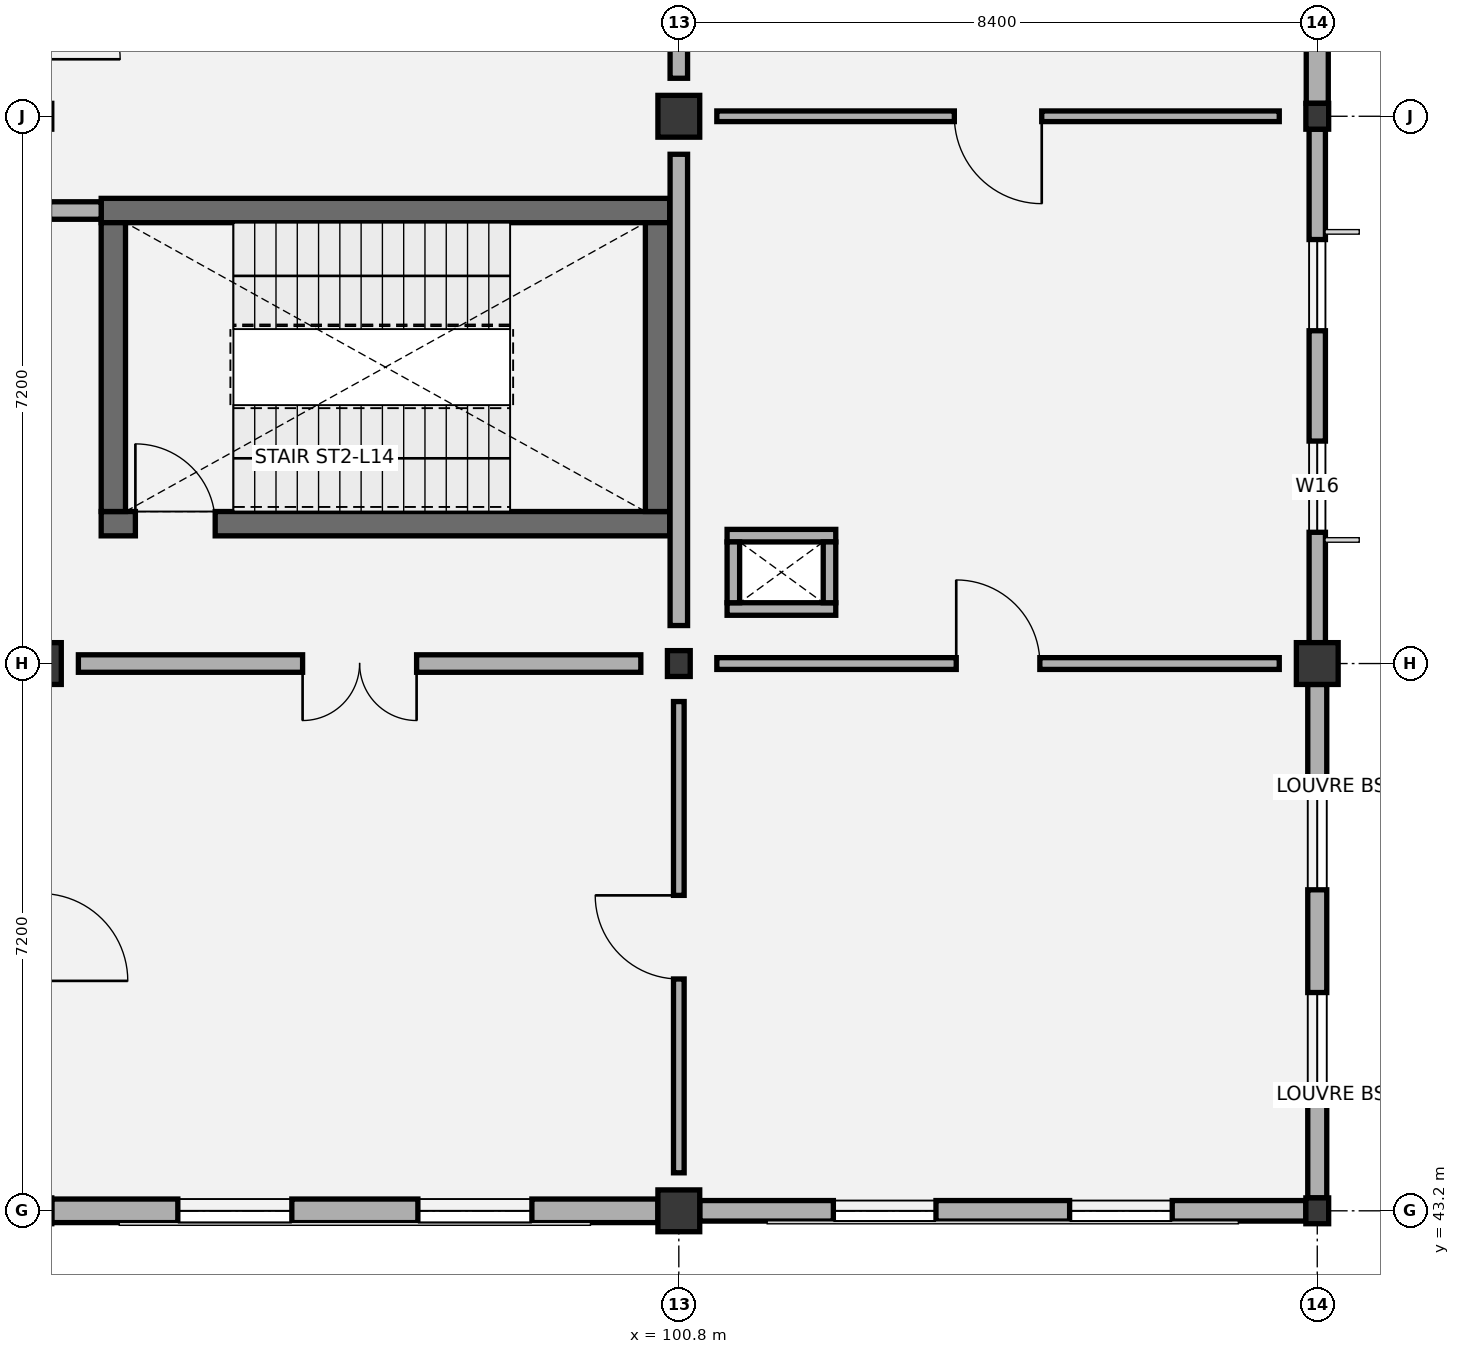
"""IFC4 building model, lengths in metres.
Left out: names, types, materials, properties, quantities, classifications, styles, units other than length and angle.
Written with IfcOpenShell. Run it as: python <this file> out.ifc"""

import sys

from ifc_helpers import new_model, si_unit, direction, frame, frame_2d, origin, origin_2d, place, context, subcontext, project, spatial, rectangle, i_section, extrude, element, fill, save


model = new_model("IFC4")
c1 = context("Model", 3, precision=1e-05, world=origin(), true_north=direction((0.0, 1.0)))
c2 = subcontext(c1, "Body", "Model", "MODEL_VIEW")
j1 = project(units=[si_unit("LENGTHUNIT", "METRE"), si_unit("PLANEANGLEUNIT", "RADIAN")], contexts=[c1])
p1 = place(None, origin())
s1 = spatial("IfcSite", under=j1, at=p1, CompositionType="ELEMENT")
p2 = place(p1, origin())
s2 = spatial("IfcBuilding", under=s1, at=p2, CompositionType="ELEMENT")
p3 = place(p2, frame((0.0, 0.0, 64.8)))
s3 = spatial("IfcBuildingStorey", under=s2, at=p3, CompositionType="ELEMENT", Elevation=64.8)
for number, where, z_axis, x_axis in (
    (1, (92.4, 50.4, 0.0), (0.0, 0.0, 1.0), (1.0, 0.0, 0.0)),
    (2, (100.8, 43.2, 0.0), (0.0, 0.0, 1.0), (1.0, 0.0, 0.0)),
):
    element("IfcColumn", number, at=place(p3, frame(where, z_axis=z_axis, x_axis=x_axis)), inside=s3, PredefinedType="COLUMN", context=c2, shape_type="SweptSolid", body=[
        extrude(rectangle(XDim=0.55, YDim=0.55, at=origin_2d()), origin(), (0.0, 0.0, 1.0), 4.2),
    ])
p4 = place(p3, frame((100.8, 50.4, 0.0), z_axis=(0.0, 0.0, 1.0), x_axis=(1.0, 0.0, 0.0)))
e3 = element("IfcColumn", 3, at=p4, inside=s3, PredefinedType="COLUMN", context=c2, shape_type="SweptSolid", body=[
    extrude(i_section(OverallWidth=0.3, OverallDepth=0.34, WebThickness=0.012, FlangeThickness=0.021, FilletRadius=0.027, at=origin_2d()), origin(), (0.0, 0.0, 1.0), 4.2),
])
p5 = place(p3, frame((100.8, 57.6, 0.0), z_axis=(0.0, 0.0, 1.0), x_axis=(1.0, 0.0, 0.0)))
e4 = element("IfcColumn", 4, at=p5, inside=s3, PredefinedType="COLUMN", context=c2, shape_type="SweptSolid", body=[
    extrude(rectangle(XDim=0.55, YDim=0.55, at=origin_2d()), origin(), (0.0, 0.0, 1.0), 4.2),
])
p6 = place(p3, frame((109.2, 43.2, 0.0), z_axis=(0.0, 0.0, 1.0), x_axis=(1.0, 0.0, 0.0)))
e5 = element("IfcColumn", 5, at=p6, inside=s3, PredefinedType="COLUMN", context=c2, shape_type="SweptSolid", body=[
    extrude(i_section(OverallWidth=0.3, OverallDepth=0.34, WebThickness=0.012, FlangeThickness=0.021, FilletRadius=0.027, at=origin_2d()), origin(), (0.0, 0.0, 1.0), 4.2),
])
p7 = place(p3, frame((109.2, 50.4, 0.0), z_axis=(0.0, 0.0, 1.0), x_axis=(1.0, 0.0, 0.0)))
e6 = element("IfcColumn", 6, at=p7, inside=s3, PredefinedType="COLUMN", context=c2, shape_type="SweptSolid", body=[
    extrude(rectangle(XDim=0.55, YDim=0.55, at=origin_2d()), origin(), (0.0, 0.0, 1.0), 4.2),
])
p8 = place(p3, frame((109.2, 57.6, 0.0), z_axis=(0.0, 0.0, 1.0), x_axis=(1.0, 0.0, 0.0)))
e7 = element("IfcColumn", 7, at=p8, inside=s3, PredefinedType="COLUMN", context=c2, shape_type="SweptSolid", body=[
    extrude(i_section(OverallWidth=0.3, OverallDepth=0.34, WebThickness=0.012, FlangeThickness=0.021, FilletRadius=0.027, at=origin_2d()), origin(), (0.0, 0.0, 1.0), 4.2),
])
p9 = place(p3, frame((93.2, 52.24, 0.0), z_axis=(0.0, 0.0, 1.0), x_axis=(1.0, 0.0, 0.0)))
e8 = element("IfcWall", 8, at=p9, inside=s3, PredefinedType="SHEAR", context=c2, shape_type="SweptSolid", body=[
    extrude(rectangle(XDim=7.48, YDim=0.32, at=frame_2d((3.74, 0.0))), origin(), (0.0, 0.0, 1.0), 3.9),
])
p10 = place(p9, frame((0.45, 0.0, 0.0)))
e9 = element("IfcOpeningElement", 9, at=p10, cuts=e8, PredefinedType="OPENING", context=c2, shape_type="SweptSolid", body=[
    extrude(rectangle(XDim=1.05, YDim=2.15, at=frame_2d((0.525, 1.075))), frame((0.0, 0.17, 0.0), z_axis=(0.0, -1.0, 0.0), x_axis=(1.0, 0.0, 0.0)), (0.0, 0.0, 1.0), 0.34),
])
p11 = place(p3, frame((93.2, 56.36, 0.0), z_axis=(0.0, 0.0, 1.0), x_axis=(1.0, 0.0, 0.0)))
e10 = element("IfcWall", 10, at=p11, inside=s3, PredefinedType="SHEAR", context=c2, shape_type="SweptSolid", body=[
    extrude(rectangle(XDim=7.48, YDim=0.32, at=frame_2d((3.74, 0.0))), origin(), (0.0, 0.0, 1.0), 3.9),
])
for number, where, z_axis, x_axis in (
    (11, (93.36, 52.4, 0.0), (0.0, 0.0, 1.0), (0.0, 1.0, 0.0)),
    (12, (100.52, 52.4, 0.0), (0.0, 0.0, 1.0), (0.0, 1.0, 0.0)),
):
    element("IfcWall", number, at=place(p3, frame(where, z_axis=z_axis, x_axis=x_axis)), inside=s3, PredefinedType="SHEAR", context=c2, shape_type="SweptSolid", body=[
        extrude(rectangle(XDim=3.8, YDim=0.32, at=frame_2d((1.9, 0.0))), origin(), (0.0, 0.0, 1.0), 3.9),
    ])
p12 = place(p3, frame((92.55, 43.2, 0.0), z_axis=(0.0, 0.0, 1.0), x_axis=(1.0, 0.0, 0.0)))
e13 = element("IfcWall", 13, at=p12, inside=s3, PredefinedType="SOLIDWALL", context=c2, shape_type="SweptSolid", body=[
    extrude(rectangle(XDim=7.975, YDim=0.31, at=frame_2d((3.987, 0.0))), origin(), (0.0, 0.0, 1.0), 3.345),
])
p13 = place(p12, frame((1.658, 0.0, 0.95)))
e14 = element("IfcOpeningElement", 14, at=p13, cuts=e13, PredefinedType="OPENING", context=c2, shape_type="SweptSolid", body=[
    extrude(rectangle(XDim=1.5, YDim=1.5, at=frame_2d((0.75, 0.75))), frame((0.0, 0.165, 0.0), z_axis=(0.0, -1.0, 0.0), x_axis=(1.0, 0.0, 0.0)), (0.0, 0.0, 1.0), 0.33),
])
p14 = place(p12, frame((4.817, 0.0, 0.95)))
e15 = element("IfcOpeningElement", 15, at=p14, cuts=e13, PredefinedType="OPENING", context=c2, shape_type="SweptSolid", body=[
    extrude(rectangle(XDim=1.5, YDim=1.5, at=frame_2d((0.75, 0.75))), frame((0.0, 0.165, 0.0), z_axis=(0.0, -1.0, 0.0), x_axis=(1.0, 0.0, 0.0)), (0.0, 0.0, 1.0), 0.33),
])
p15 = place(p3, frame((101.075, 43.2, 0.0), z_axis=(0.0, 0.0, 1.0), x_axis=(1.0, 0.0, 0.0)))
e16 = element("IfcWall", 16, at=p15, inside=s3, PredefinedType="SOLIDWALL", context=c2, shape_type="SweptSolid", body=[
    extrude(rectangle(XDim=7.975, YDim=0.27, at=frame_2d((3.988, 0.0))), origin(), (0.0, 0.0, 1.0), 3.345),
])
p16 = place(p15, frame((1.758, 0.0, 0.95)))
e17 = element("IfcOpeningElement", 17, at=p16, cuts=e16, PredefinedType="OPENING", context=c2, shape_type="SweptSolid", body=[
    extrude(rectangle(XDim=1.35, YDim=1.65, at=frame_2d((0.675, 0.825))), frame((0.0, 0.145, 0.0), z_axis=(0.0, -1.0, 0.0), x_axis=(1.0, 0.0, 0.0)), (0.0, 0.0, 1.0), 0.29),
])
p17 = place(p15, frame((4.867, 0.0, 0.95)))
e18 = element("IfcOpeningElement", 18, at=p17, cuts=e16, PredefinedType="OPENING", context=c2, shape_type="SweptSolid", body=[
    extrude(rectangle(XDim=1.35, YDim=1.65, at=frame_2d((0.675, 0.825))), frame((0.0, 0.145, 0.0), z_axis=(0.0, -1.0, 0.0), x_axis=(1.0, 0.0, 0.0)), (0.0, 0.0, 1.0), 0.29),
])
p18 = place(p3, frame((109.2, 43.37, 0.0), z_axis=(0.0, 0.0, 1.0), x_axis=(0.0, 1.0, 0.0)))
e19 = element("IfcWall", 19, at=p18, inside=s3, PredefinedType="SOLIDWALL", context=c2, shape_type="SweptSolid", body=[
    extrude(rectangle(XDim=6.755, YDim=0.25, at=frame_2d((3.377, 0.0))), origin(), (0.0, 0.0, 1.0), 3.345),
])
p19 = place(p18, frame((1.352, 0.0, 0.95)))
e20 = element("IfcOpeningElement", 20, at=p19, cuts=e19, PredefinedType="OPENING", context=c2, shape_type="SweptSolid", body=[
    extrude(rectangle(XDim=1.35, YDim=1.65, at=frame_2d((0.675, 0.825))), frame((0.0, 0.135, 0.0), z_axis=(0.0, -1.0, 0.0), x_axis=(1.0, 0.0, 0.0)), (0.0, 0.0, 1.0), 0.27),
])
p20 = place(p18, frame((4.053, 0.0, 0.95)))
e21 = element("IfcOpeningElement", 21, at=p20, cuts=e19, PredefinedType="OPENING", context=c2, shape_type="SweptSolid", body=[
    extrude(rectangle(XDim=1.35, YDim=1.65, at=frame_2d((0.675, 0.825))), frame((0.0, 0.135, 0.0), z_axis=(0.0, -1.0, 0.0), x_axis=(1.0, 0.0, 0.0)), (0.0, 0.0, 1.0), 0.27),
])
p21 = place(p3, frame((109.2, 50.675, 0.0), z_axis=(0.0, 0.0, 1.0), x_axis=(0.0, 1.0, 0.0)))
e22 = element("IfcWall", 22, at=p21, inside=s3, PredefinedType="SOLIDWALL", context=c2, shape_type="SweptSolid", body=[
    extrude(rectangle(XDim=6.755, YDim=0.215, at=frame_2d((3.377, 0.0))), origin(), (0.0, 0.0, 1.0), 3.345),
])
p22 = place(p21, frame((1.452, 0.0, 0.95)))
e23 = element("IfcOpeningElement", 23, at=p22, cuts=e22, PredefinedType="OPENING", context=c2, shape_type="SweptSolid", body=[
    extrude(rectangle(XDim=1.2, YDim=1.5, at=frame_2d((0.6, 0.75))), frame((0.0, 0.117, 0.0), z_axis=(0.0, -1.0, 0.0), x_axis=(1.0, 0.0, 0.0)), (0.0, 0.0, 1.0), 0.235),
])
p23 = place(p21, frame((4.103, 0.0, 0.95)))
e24 = element("IfcOpeningElement", 24, at=p23, cuts=e22, PredefinedType="OPENING", context=c2, shape_type="SweptSolid", body=[
    extrude(rectangle(XDim=1.2, YDim=1.5, at=frame_2d((0.6, 0.75))), frame((0.0, 0.117, 0.0), z_axis=(0.0, -1.0, 0.0), x_axis=(1.0, 0.0, 0.0)), (0.0, 0.0, 1.0), 0.235),
])
p24 = place(p3, frame((109.2, 57.77, 0.0), z_axis=(0.0, 0.0, 1.0), x_axis=(0.0, 1.0, 0.0)))
e25 = element("IfcWall", 25, at=p24, inside=s3, PredefinedType="SOLIDWALL", context=c2, shape_type="SweptSolid", body=[
    extrude(rectangle(XDim=6.755, YDim=0.29, at=frame_2d((3.377, 0.0))), origin(), (0.0, 0.0, 1.0), 3.445),
])
p25 = place(p24, frame((1.052, 0.0, 0.95)))
e26 = element("IfcOpeningElement", 26, at=p25, cuts=e25, PredefinedType="OPENING", context=c2, shape_type="SweptSolid", body=[
    extrude(rectangle(XDim=1.8, YDim=1.5, at=frame_2d((0.9, 0.75))), frame((0.0, 0.155, 0.0), z_axis=(0.0, -1.0, 0.0), x_axis=(1.0, 0.0, 0.0)), (0.0, 0.0, 1.0), 0.31),
])
p26 = place(p24, frame((3.903, 0.0, 0.95)))
e27 = element("IfcOpeningElement", 27, at=p26, cuts=e25, PredefinedType="OPENING", context=c2, shape_type="SweptSolid", body=[
    extrude(rectangle(XDim=1.8, YDim=1.5, at=frame_2d((0.9, 0.75))), frame((0.0, 0.155, 0.0), z_axis=(0.0, -1.0, 0.0), x_axis=(1.0, 0.0, 0.0)), (0.0, 0.0, 1.0), 0.31),
])
for number, where, z_axis, x_axis in (
    (28, (101.435, 51.117, 0.0), (0.0, 0.0, 1.0), (1.0, 0.0, 0.0)),
    (29, (101.435, 52.083, 0.0), (0.0, 0.0, 1.0), (1.0, 0.0, 0.0)),
):
    element("IfcWall", number, at=place(p3, frame(where, z_axis=z_axis, x_axis=x_axis)), inside=s3, PredefinedType="PARTITIONING", context=c2, shape_type="SweptSolid", body=[
        extrude(rectangle(XDim=1.43, YDim=0.165, at=frame_2d((0.715, 0.0))), origin(), (0.0, 0.0, 1.0), 3.9),
    ])
for number, where, z_axis, x_axis in (
    (30, (101.518, 51.2, 0.0), (0.0, 0.0, 1.0), (0.0, 1.0, 0.0)),
    (31, (102.782, 51.2, 0.0), (0.0, 0.0, 1.0), (0.0, 1.0, 0.0)),
):
    element("IfcWall", number, at=place(p3, frame(where, z_axis=z_axis, x_axis=x_axis)), inside=s3, PredefinedType="PARTITIONING", context=c2, shape_type="SweptSolid", body=[
        extrude(rectangle(XDim=0.8, YDim=0.165, at=frame_2d((0.4, 0.0))), origin(), (0.0, 0.0, 1.0), 3.9),
    ])
p27 = place(p3, frame((100.8, 43.7, 0.0), z_axis=(0.0, 0.0, 1.0), x_axis=(0.0, 1.0, 0.0)))
e32 = element("IfcWall", 32, at=p27, inside=s3, PredefinedType="PARTITIONING", context=c2, shape_type="SweptSolid", body=[
    extrude(rectangle(XDim=6.2, YDim=0.14, at=frame_2d((3.1, 0.0))), origin(), (0.0, 0.0, 1.0), 3.605),
])
p28 = place(p27, frame((2.55, 0.0, 0.0)))
e33 = element("IfcOpeningElement", 33, at=p28, cuts=e32, PredefinedType="OPENING", context=c2, shape_type="SweptSolid", body=[
    extrude(rectangle(XDim=1.1, YDim=2.1, at=frame_2d((0.55, 1.05))), frame((0.0, 0.08, 0.0), z_axis=(0.0, -1.0, 0.0), x_axis=(1.0, 0.0, 0.0)), (0.0, 0.0, 1.0), 0.16),
])
p29 = place(p3, frame((92.9, 50.4, 0.0), z_axis=(0.0, 0.0, 1.0), x_axis=(1.0, 0.0, 0.0)))
e34 = element("IfcWall", 34, at=p29, inside=s3, PredefinedType="PARTITIONING", context=c2, shape_type="SweptSolid", body=[
    extrude(rectangle(XDim=7.4, YDim=0.23, at=frame_2d((3.7, 0.0))), origin(), (0.0, 0.0, 1.0), 3.395),
])
p30 = place(p29, frame((2.95, 0.0, 0.0)))
e35 = element("IfcOpeningElement", 35, at=p30, cuts=e34, PredefinedType="OPENING", context=c2, shape_type="SweptSolid", body=[
    extrude(rectangle(XDim=1.5, YDim=2.15, at=frame_2d((0.75, 1.075))), frame((0.0, 0.125, 0.0), z_axis=(0.0, -1.0, 0.0), x_axis=(1.0, 0.0, 0.0)), (0.0, 0.0, 1.0), 0.25),
])
p31 = place(p3, frame((100.8, 50.9, 0.0), z_axis=(0.0, 0.0, 1.0), x_axis=(0.0, 1.0, 0.0)))
e36 = element("IfcWall", 36, at=p31, inside=s3, PredefinedType="PARTITIONING", context=c2, shape_type="SweptSolid", body=[
    extrude(rectangle(XDim=6.2, YDim=0.23, at=frame_2d((3.1, 0.0))), origin(), (0.0, 0.0, 1.0), 3.395),
])
p32 = place(p3, frame((92.52, 56.36, 0.0), z_axis=(0.0, 0.0, 1.0), x_axis=(1.0, 0.0, 0.0)))
e37 = element("IfcWall", 37, at=p32, inside=s3, PredefinedType="PARTITIONING", context=c2, shape_type="SweptSolid", body=[
    extrude(rectangle(XDim=0.68, YDim=0.23, at=frame_2d((0.34, 0.0))), origin(), (0.0, 0.0, 1.0), 3.9),
])
p33 = place(p3, frame((100.8, 58.1, 0.0), z_axis=(0.0, 0.0, 1.0), x_axis=(0.0, 1.0, 0.0)))
e38 = element("IfcWall", 38, at=p33, inside=s3, PredefinedType="PARTITIONING", context=c2, shape_type="SweptSolid", body=[
    extrude(rectangle(XDim=6.2, YDim=0.23, at=frame_2d((3.1, 0.0))), origin(), (0.0, 0.0, 1.0), 3.395),
])
p34 = place(p3, frame((101.3, 50.4, 0.0), z_axis=(0.0, 0.0, 1.0), x_axis=(1.0, 0.0, 0.0)))
e39 = element("IfcWall", 39, at=p34, inside=s3, PredefinedType="PARTITIONING", context=c2, shape_type="SweptSolid", body=[
    extrude(rectangle(XDim=7.4, YDim=0.155, at=frame_2d((3.7, 0.0))), origin(), (0.0, 0.0, 1.0), 3.395),
])
p35 = place(p34, frame((3.15, 0.0, 0.0)))
e40 = element("IfcOpeningElement", 40, at=p35, cuts=e39, PredefinedType="OPENING", context=c2, shape_type="SweptSolid", body=[
    extrude(rectangle(XDim=1.1, YDim=2.1, at=frame_2d((0.55, 1.05))), frame((0.0, 0.087, 0.0), z_axis=(0.0, -1.0, 0.0), x_axis=(1.0, 0.0, 0.0)), (0.0, 0.0, 1.0), 0.175),
])
p36 = place(p3, frame((101.3, 57.6, 0.0), z_axis=(0.0, 0.0, 1.0), x_axis=(1.0, 0.0, 0.0)))
e41 = element("IfcWall", 41, at=p36, inside=s3, PredefinedType="PARTITIONING", context=c2, shape_type="SweptSolid", body=[
    extrude(rectangle(XDim=7.4, YDim=0.14, at=frame_2d((3.7, 0.0))), origin(), (0.0, 0.0, 1.0), 3.395),
])
p37 = place(p36, frame((3.125, 0.0, 0.0)))
e42 = element("IfcOpeningElement", 42, at=p37, cuts=e41, PredefinedType="OPENING", context=c2, shape_type="SweptSolid", body=[
    extrude(rectangle(XDim=1.15, YDim=2.1, at=frame_2d((0.575, 1.05))), frame((0.0, 0.08, 0.0), z_axis=(0.0, -1.0, 0.0), x_axis=(1.0, 0.0, 0.0)), (0.0, 0.0, 1.0), 0.16),
])
p38 = place(p13, origin())
e43 = element("IfcWindow", 43, at=p38, inside=s3, PartitioningType="SINGLE_PANEL", PredefinedType="WINDOW", context=c2, shape_type="SweptSolid", body=[
    extrude(rectangle(XDim=1.5, YDim=1.5, at=frame_2d((0.75, 0.75))), frame((0.0, 0.03, 0.0), z_axis=(0.0, -1.0, 0.0), x_axis=(1.0, 0.0, 0.0)), (0.0, 0.0, 1.0), 0.06),
])
fill(e14, e43)
p39 = place(p14, origin())
e44 = element("IfcWindow", 44, at=p39, inside=s3, PartitioningType="SINGLE_PANEL", PredefinedType="WINDOW", context=c2, shape_type="SweptSolid", body=[
    extrude(rectangle(XDim=1.5, YDim=1.5, at=frame_2d((0.75, 0.75))), frame((0.0, 0.03, 0.0), z_axis=(0.0, -1.0, 0.0), x_axis=(1.0, 0.0, 0.0)), (0.0, 0.0, 1.0), 0.06),
])
fill(e15, e44)
p40 = place(p16, origin())
e45 = element("IfcWindow", 45, at=p40, inside=s3, PartitioningType="SINGLE_PANEL", PredefinedType="WINDOW", context=c2, shape_type="SweptSolid", body=[
    extrude(rectangle(XDim=1.35, YDim=1.65, at=frame_2d((0.675, 0.825))), frame((0.0, 0.03, 0.0), z_axis=(0.0, -1.0, 0.0), x_axis=(1.0, 0.0, 0.0)), (0.0, 0.0, 1.0), 0.06),
])
fill(e17, e45)
p41 = place(p17, origin())
e46 = element("IfcWindow", 46, at=p41, inside=s3, PartitioningType="SINGLE_PANEL", PredefinedType="WINDOW", context=c2, shape_type="SweptSolid", body=[
    extrude(rectangle(XDim=1.35, YDim=1.65, at=frame_2d((0.675, 0.825))), frame((0.0, 0.03, 0.0), z_axis=(0.0, -1.0, 0.0), x_axis=(1.0, 0.0, 0.0)), (0.0, 0.0, 1.0), 0.06),
])
fill(e18, e46)
p42 = place(p19, origin())
e47 = element("IfcWindow", 47, at=p42, inside=s3, PartitioningType="SINGLE_PANEL", PredefinedType="WINDOW", context=c2, shape_type="SweptSolid", body=[
    extrude(rectangle(XDim=1.35, YDim=1.65, at=frame_2d((0.675, 0.825))), frame((0.0, 0.03, 0.0), z_axis=(0.0, -1.0, 0.0), x_axis=(1.0, 0.0, 0.0)), (0.0, 0.0, 1.0), 0.06),
])
fill(e20, e47)
p43 = place(p20, origin())
e48 = element("IfcWindow", 48, at=p43, inside=s3, PartitioningType="SINGLE_PANEL", PredefinedType="WINDOW", context=c2, shape_type="SweptSolid", body=[
    extrude(rectangle(XDim=1.35, YDim=1.65, at=frame_2d((0.675, 0.825))), frame((0.0, 0.03, 0.0), z_axis=(0.0, -1.0, 0.0), x_axis=(1.0, 0.0, 0.0)), (0.0, 0.0, 1.0), 0.06),
])
fill(e21, e48)
p44 = place(p22, origin())
e49 = element("IfcWindow", 49, at=p44, inside=s3, PartitioningType="SINGLE_PANEL", PredefinedType="WINDOW", context=c2, shape_type="SweptSolid", body=[
    extrude(rectangle(XDim=1.2, YDim=1.5, at=frame_2d((0.6, 0.75))), frame((0.0, 0.03, 0.0), z_axis=(0.0, -1.0, 0.0), x_axis=(1.0, 0.0, 0.0)), (0.0, 0.0, 1.0), 0.06),
])
fill(e23, e49)
p45 = place(p23, origin())
e50 = element("IfcWindow", 50, at=p45, inside=s3, PartitioningType="SINGLE_PANEL", PredefinedType="WINDOW", context=c2, shape_type="SweptSolid", body=[
    extrude(rectangle(XDim=1.2, YDim=1.5, at=frame_2d((0.6, 0.75))), frame((0.0, 0.03, 0.0), z_axis=(0.0, -1.0, 0.0), x_axis=(1.0, 0.0, 0.0)), (0.0, 0.0, 1.0), 0.06),
])
fill(e24, e50)
p46 = place(p10, origin())
e51 = element("IfcDoor", 51, at=p46, inside=s3, OperationType="SINGLE_SWING_LEFT", PredefinedType="DOOR", context=c2, shape_type="SweptSolid", body=[
    extrude(rectangle(XDim=1.05, YDim=2.15, at=frame_2d((0.525, 1.075))), frame((0.0, 0.025, 0.0), z_axis=(0.0, -1.0, 0.0), x_axis=(1.0, 0.0, 0.0)), (0.0, 0.0, 1.0), 0.05),
])
fill(e9, e51)
p47 = place(p28, origin())
e52 = element("IfcDoor", 52, at=p47, inside=s3, OperationType="SINGLE_SWING_RIGHT", PredefinedType="DOOR", context=c2, shape_type="SweptSolid", body=[
    extrude(rectangle(XDim=1.1, YDim=2.1, at=frame_2d((0.55, 1.05))), frame((0.0, 0.025, 0.0), z_axis=(0.0, -1.0, 0.0), x_axis=(1.0, 0.0, 0.0)), (0.0, 0.0, 1.0), 0.05),
])
fill(e33, e52)
p48 = place(p30, frame((1.5, 0.0, 0.0), z_axis=(0.0, 0.0, 1.0), x_axis=(-1.0, 0.0, 0.0)))
e53 = element("IfcDoor", 53, at=p48, inside=s3, OperationType="DOUBLE_DOOR_SINGLE_SWING", PredefinedType="DOOR", context=c2, shape_type="SweptSolid", body=[
    extrude(rectangle(XDim=1.5, YDim=2.15, at=frame_2d((0.75, 1.075))), frame((0.0, 0.025, 0.0), z_axis=(0.0, -1.0, 0.0), x_axis=(1.0, 0.0, 0.0)), (0.0, 0.0, 1.0), 0.05),
])
fill(e35, e53)
p49 = place(p35, origin())
e54 = element("IfcDoor", 54, at=p49, inside=s3, OperationType="SINGLE_SWING_LEFT", PredefinedType="DOOR", context=c2, shape_type="SweptSolid", body=[
    extrude(rectangle(XDim=1.1, YDim=2.1, at=frame_2d((0.55, 1.05))), frame((0.0, 0.025, 0.0), z_axis=(0.0, -1.0, 0.0), x_axis=(1.0, 0.0, 0.0)), (0.0, 0.0, 1.0), 0.05),
])
fill(e40, e54)
p50 = place(p37, frame((1.15, 0.0, 0.0), z_axis=(0.0, 0.0, 1.0), x_axis=(-1.0, 0.0, 0.0)))
e55 = element("IfcDoor", 55, at=p50, inside=s3, OperationType="SINGLE_SWING_LEFT", PredefinedType="DOOR", context=c2, shape_type="SweptSolid", body=[
    extrude(rectangle(XDim=1.15, YDim=2.1, at=frame_2d((0.575, 1.05))), frame((0.0, 0.025, 0.0), z_axis=(0.0, -1.0, 0.0), x_axis=(1.0, 0.0, 0.0)), (0.0, 0.0, 1.0), 0.05),
])
fill(e42, e55)
save(model, sys.argv[1])
